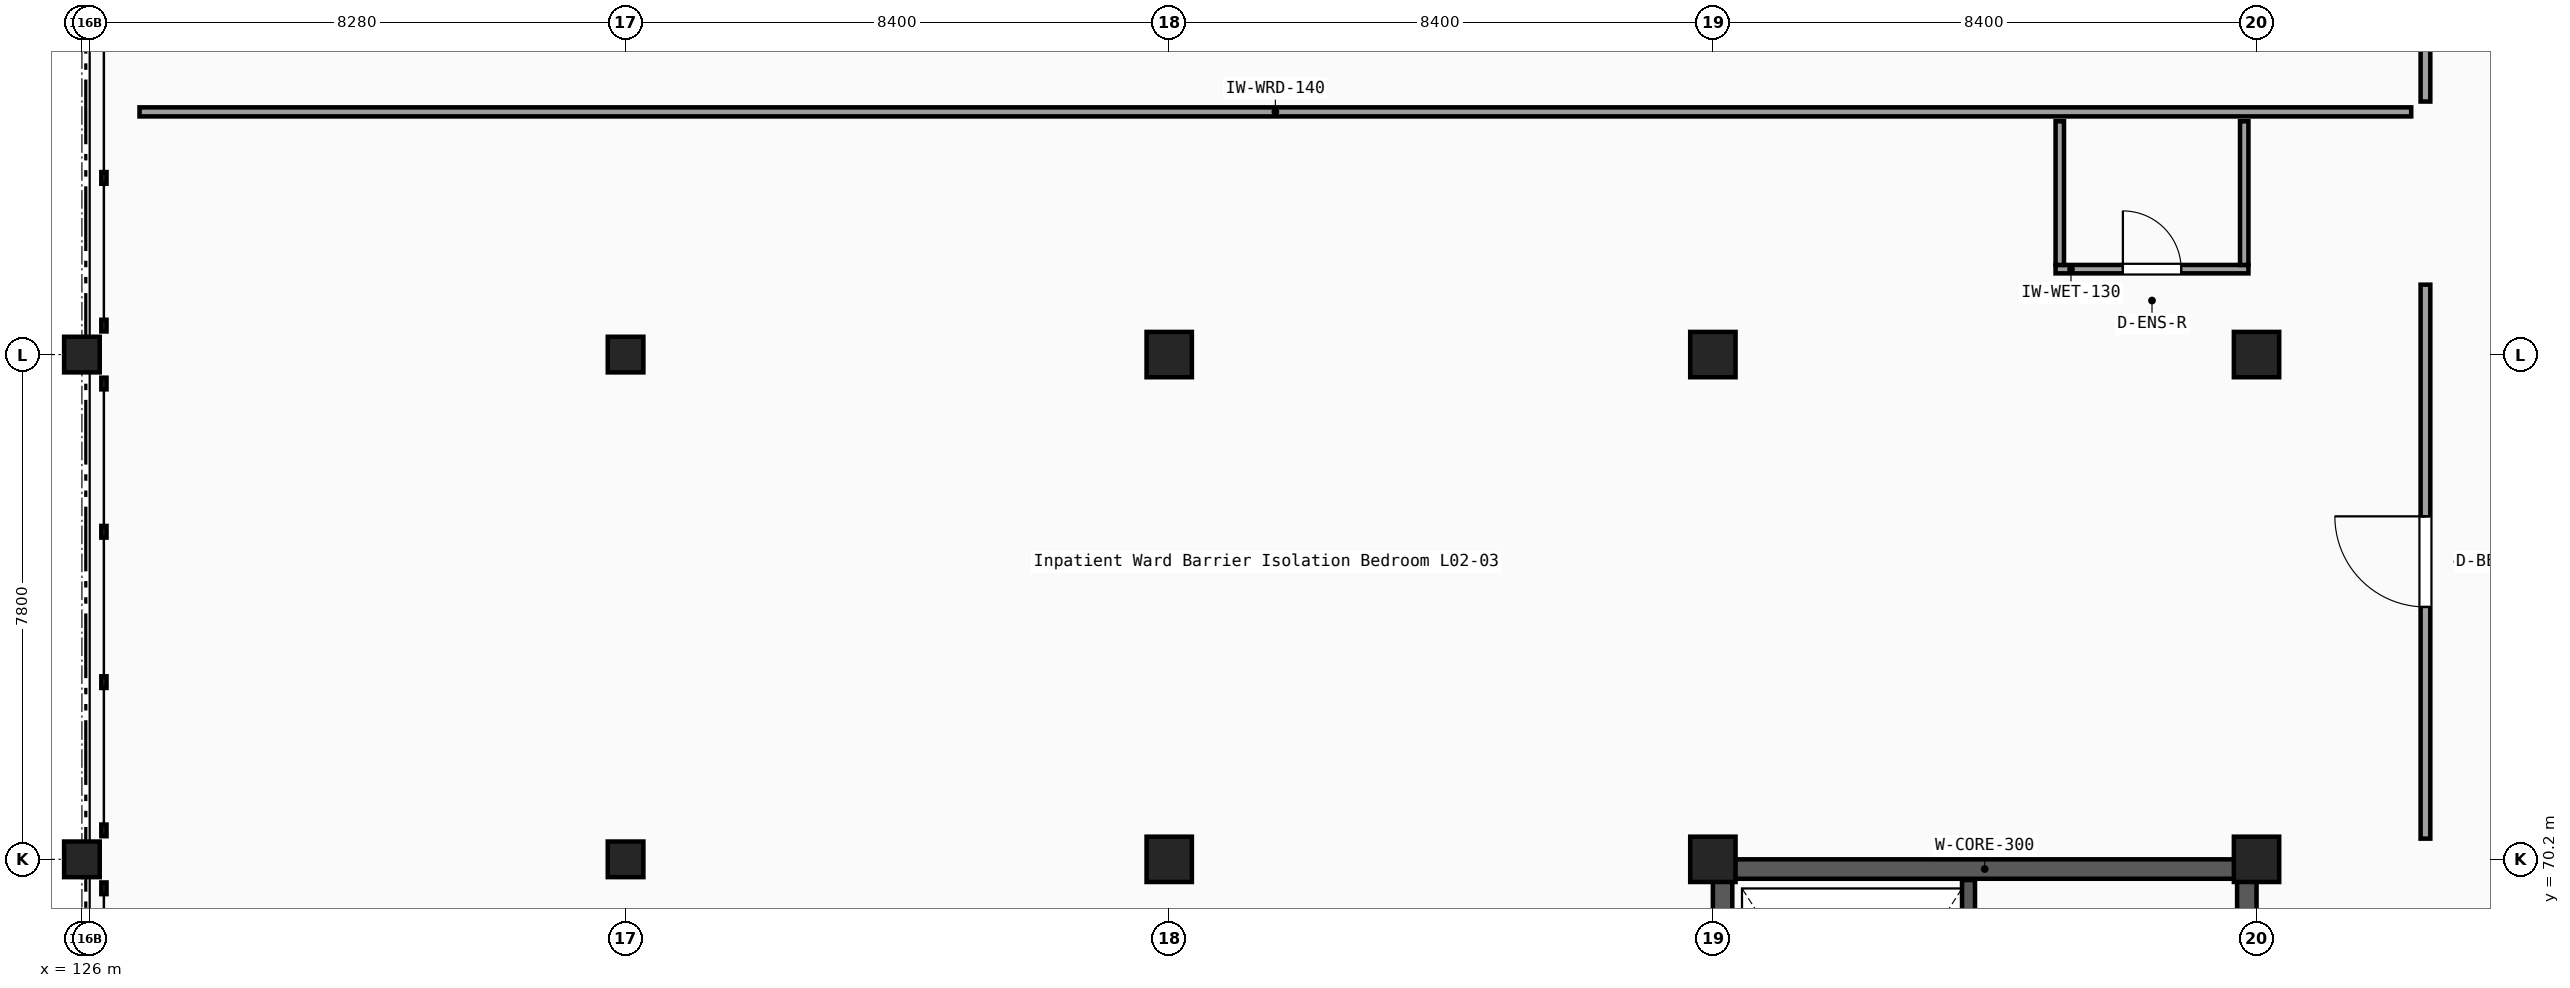
"""IFC4 building model, lengths in metres.
Left out: names, types, materials, properties, quantities, classifications, styles, units other than length and angle.
Written with IfcOpenShell. Run it as: python <this file> out.ifc"""

import sys

from ifc_helpers import new_model, si_unit, direction, frame, frame_2d, origin, origin_2d, place, context, subcontext, project, spatial, rectangle, i_section, extrude, element, fill, save


model = new_model("IFC4")
c1 = context("Model", 3, precision=1e-05, world=origin(), true_north=direction((0.0, 1.0)))
c2 = subcontext(c1, "Body", "Model", "MODEL_VIEW")
j1 = project(units=[si_unit("LENGTHUNIT", "METRE"), si_unit("PLANEANGLEUNIT", "RADIAN")], contexts=[c1])
p1 = place(None, origin())
s1 = spatial("IfcSite", under=j1, at=p1, CompositionType="ELEMENT")
p2 = place(p1, origin())
s2 = spatial("IfcBuilding", under=s1, at=p2, CompositionType="ELEMENT")
p3 = place(p2, frame((0.0, 0.0, 10.2)))
s3 = spatial("IfcBuildingStorey", under=s2, at=p3, CompositionType="ELEMENT", Elevation=10.2)
for number, where, z_axis, x_axis in (
    (1, (126.0, 70.2, 0.0), (0.0, 0.0, 1.0), (1.0, 0.0, 0.0)),
    (2, (126.0, 78.0, 0.0), (0.0, 0.0, 1.0), (1.0, 0.0, 0.0)),
    (3, (134.4, 70.2, 0.0), (0.0, 0.0, 1.0), (1.0, 0.0, 0.0)),
    (4, (134.4, 78.0, 0.0), (0.0, 0.0, 1.0), (1.0, 0.0, 0.0)),
):
    element("IfcColumn", number, at=place(p3, frame(where, z_axis=z_axis, x_axis=x_axis)), inside=s3, PredefinedType="COLUMN", context=c2, shape_type="SweptSolid", body=[
        extrude(i_section(OverallWidth=0.3, OverallDepth=0.55, WebThickness=0.015, FlangeThickness=0.029, FilletRadius=0.027, at=origin_2d()), origin(), (0.0, 0.0, 1.0), 4.65),
    ])
for number, where, z_axis, x_axis in (
    (5, (142.8, 70.2, 0.0), (0.0, 0.0, 1.0), (1.0, 0.0, 0.0)),
    (6, (142.8, 78.0, 0.0), (0.0, 0.0, 1.0), (1.0, 0.0, 0.0)),
    (7, (151.2, 70.2, 0.0), (0.0, 0.0, 1.0), (1.0, 0.0, 0.0)),
    (8, (151.2, 78.0, 0.0), (0.0, 0.0, 1.0), (1.0, 0.0, 0.0)),
    (9, (159.6, 70.2, 0.0), (0.0, 0.0, 1.0), (1.0, 0.0, 0.0)),
    (10, (159.6, 78.0, 0.0), (0.0, 0.0, 1.0), (1.0, 0.0, 0.0)),
):
    element("IfcColumn", number, at=place(p3, frame(where, z_axis=z_axis, x_axis=x_axis)), inside=s3, PredefinedType="COLUMN", context=c2, shape_type="SweptSolid", body=[
        extrude(rectangle(XDim=0.7, YDim=0.7, at=origin_2d()), origin(), (0.0, 0.0, 1.0), 4.65),
    ])
p4 = place(p3, frame((151.2, 70.05, 0.0), z_axis=(0.0, 0.0, 1.0), x_axis=(1.0, 0.0, 0.0)))
e11 = element("IfcWall", 11, at=p4, inside=s3, PredefinedType="SHEAR", context=c2, shape_type="SweptSolid", body=[
    extrude(rectangle(XDim=8.4, YDim=0.3, at=frame_2d((4.2, 0.0))), origin(), (0.0, 0.0, 1.0), 4.41),
])
for number, where, z_axis, x_axis in (
    (12, (151.35, 62.7, 0.0), (0.0, 0.0, 1.0), (0.0, 1.0, 0.0)),
    (13, (159.45, 62.7, 0.0), (0.0, 0.0, 1.0), (0.0, 1.0, 0.0)),
):
    element("IfcWall", number, at=place(p3, frame(where, z_axis=z_axis, x_axis=x_axis)), inside=s3, PredefinedType="SHEAR", context=c2, shape_type="SweptSolid", body=[
        extrude(rectangle(XDim=7.2, YDim=0.3, at=frame_2d((3.6, 0.0))), origin(), (0.0, 0.0, 1.0), 4.41),
    ])
p5 = place(p3, frame((155.15, 62.72, 0.0), z_axis=(0.0, 0.0, 1.0), x_axis=(0.0, 1.0, 0.0)))
e14 = element("IfcWall", 14, at=p5, inside=s3, PredefinedType="SHEAR", context=c2, shape_type="SweptSolid", body=[
    extrude(rectangle(XDim=7.16, YDim=0.2, at=frame_2d((3.58, 0.0))), origin(), (0.0, 0.0, 1.0), 4.41),
])
p6 = place(p3, frame((162.21, 70.52, 0.0), z_axis=(0.0, 0.0, 1.0), x_axis=(0.0, 1.0, 0.0)))
e15 = element("IfcWall", 15, at=p6, inside=s3, PredefinedType="PARTITIONING", context=c2, shape_type="SweptSolid", body=[
    extrude(rectangle(XDim=8.56, YDim=0.15, at=frame_2d((4.28, 0.0))), origin(), (0.0, 0.0, 1.0), 3.95),
])
p7 = place(p6, frame((3.58, 0.0, 0.0)))
e16 = element("IfcOpeningElement", 16, at=p7, cuts=e15, PredefinedType="OPENING", context=c2, shape_type="SweptSolid", body=[
    extrude(rectangle(XDim=1.4, YDim=2.2, at=frame_2d((0.7, 1.1))), frame((0.0, 0.085, 0.0), z_axis=(0.0, -1.0, 0.0), x_axis=(1.0, 0.0, 0.0)), (0.0, 0.0, 1.0), 0.17),
])
p8 = place(p3, frame((126.89, 81.75, 0.0), z_axis=(0.0, 0.0, 1.0), x_axis=(1.0, 0.0, 0.0)))
e17 = element("IfcWall", 17, at=p8, inside=s3, PredefinedType="PARTITIONING", context=c2, shape_type="SweptSolid", body=[
    extrude(rectangle(XDim=35.1, YDim=0.14, at=frame_2d((17.55, 0.0))), origin(), (0.0, 0.0, 1.0), 4.08),
])
p9 = place(p3, frame((156.495, 79.32, 0.0), z_axis=(0.0, 0.0, 1.0), x_axis=(1.0, 0.0, 0.0)))
e18 = element("IfcWall", 18, at=p9, inside=s3, PredefinedType="PARTITIONING", context=c2, shape_type="SweptSolid", body=[
    extrude(rectangle(XDim=2.98, YDim=0.13, at=frame_2d((1.49, 0.0))), origin(), (0.0, 0.0, 1.0), 4.08),
])
p10 = place(p9, frame((1.04, 0.0, 0.0)))
e19 = element("IfcOpeningElement", 19, at=p10, cuts=e18, PredefinedType="OPENING", context=c2, shape_type="SweptSolid", body=[
    extrude(rectangle(XDim=0.9, YDim=2.1, at=frame_2d((0.45, 1.05))), frame((0.0, 0.075, 0.0), z_axis=(0.0, -1.0, 0.0), x_axis=(1.0, 0.0, 0.0)), (0.0, 0.0, 1.0), 0.15),
])
p11 = place(p3, frame((156.56, 79.385, 0.0), z_axis=(0.0, 0.0, 1.0), x_axis=(0.0, 1.0, 0.0)))
e20 = element("IfcWall", 20, at=p11, inside=s3, PredefinedType="PARTITIONING", context=c2, shape_type="SweptSolid", body=[
    extrude(rectangle(XDim=2.22, YDim=0.13, at=frame_2d((1.11, 0.0))), origin(), (0.0, 0.0, 1.0), 4.37),
])
p12 = place(p3, frame((159.41, 79.385, 0.0), z_axis=(0.0, 0.0, 1.0), x_axis=(0.0, 1.0, 0.0)))
e21 = element("IfcWall", 21, at=p12, inside=s3, PredefinedType="PARTITIONING", context=c2, shape_type="SweptSolid", body=[
    extrude(rectangle(XDim=2.22, YDim=0.13, at=frame_2d((1.11, 0.0))), origin(), (0.0, 0.0, 1.0), 4.08),
])
p13 = place(p3, frame((162.21, 81.91, 0.0), z_axis=(0.0, 0.0, 1.0), x_axis=(0.0, 1.0, 0.0)))
e22 = element("IfcWall", 22, at=p13, inside=s3, PredefinedType="PARTITIONING", context=c2, shape_type="SweptSolid", body=[
    extrude(rectangle(XDim=11.07, YDim=0.15, at=frame_2d((5.535, 0.0))), origin(), (0.0, 0.0, 1.0), 4.05),
])
p14 = place(p13, frame((5.01, 0.0, 0.0)))
e23 = element("IfcOpeningElement", 23, at=p14, cuts=e22, PredefinedType="OPENING", context=c2, shape_type="SweptSolid", body=[
    extrude(rectangle(XDim=1.05, YDim=2.15, at=frame_2d((0.525, 1.075))), frame((0.0, 0.085, 0.0), z_axis=(0.0, -1.0, 0.0), x_axis=(1.0, 0.0, 0.0)), (0.0, 0.0, 1.0), 0.17),
])
p15 = place(p7, origin())
e24 = element("IfcDoor", 24, at=p15, inside=s3, OperationType="SINGLE_SWING_RIGHT", PredefinedType="DOOR", context=c2, shape_type="SweptSolid", body=[
    extrude(rectangle(XDim=1.4, YDim=2.2, at=frame_2d((0.7, 1.1))), frame((0.0, 0.025, 0.0), z_axis=(0.0, -1.0, 0.0), x_axis=(1.0, 0.0, 0.0)), (0.0, 0.0, 1.0), 0.05),
])
fill(e16, e24)
p16 = place(p10, origin())
e25 = element("IfcDoor", 25, at=p16, inside=s3, OperationType="SINGLE_SWING_LEFT", PredefinedType="DOOR", context=c2, shape_type="SweptSolid", body=[
    extrude(rectangle(XDim=0.9, YDim=2.1, at=frame_2d((0.45, 1.05))), frame((0.0, 0.025, 0.0), z_axis=(0.0, -1.0, 0.0), x_axis=(1.0, 0.0, 0.0)), (0.0, 0.0, 1.0), 0.05),
])
fill(e19, e25)
save(model, sys.argv[1])
